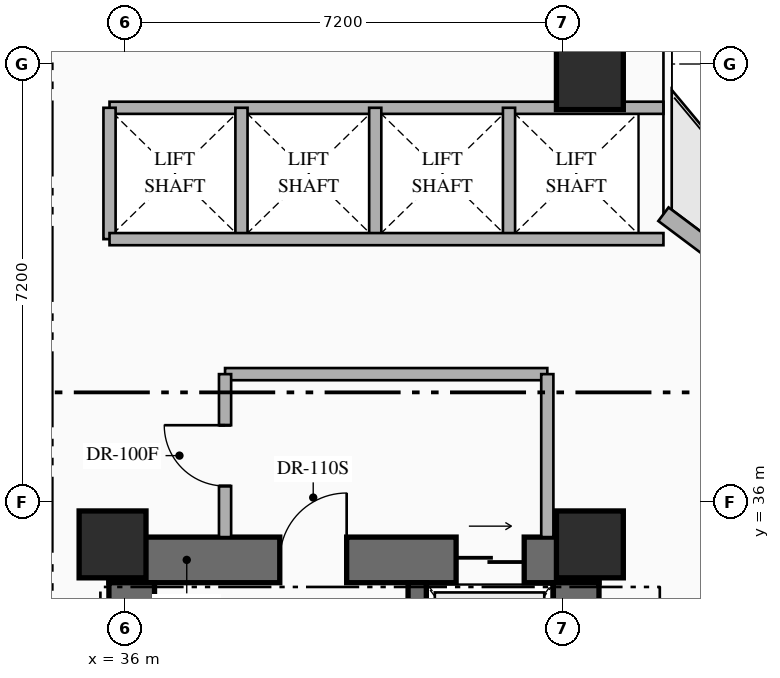
"""IFC4 building model, lengths in metres.
Left out: names, types, materials, properties, quantities, classifications, styles, units other than length and angle.
Written with IfcOpenShell. Run it as: python <this file> out.ifc"""

import sys

from ifc_helpers import new_model, si_unit, direction, frame, frame_2d, origin, origin_2d, place, context, subcontext, project, spatial, rectangle, extrude, element, fill, save


model = new_model("IFC4")
c1 = context("Model", 3, precision=1e-05, world=origin(), true_north=direction((0.0, 1.0)))
c2 = subcontext(c1, "Body", "Model", "MODEL_VIEW")
j1 = project(units=[si_unit("LENGTHUNIT", "METRE"), si_unit("PLANEANGLEUNIT", "RADIAN")], contexts=[c1])
p1 = place(None, origin())
s1 = spatial("IfcSite", under=j1, at=p1, CompositionType="ELEMENT")
p2 = place(p1, origin())
s2 = spatial("IfcBuilding", under=s1, at=p2, CompositionType="ELEMENT")
p3 = place(p2, frame((0.0, 0.0, 36.6)))
s3 = spatial("IfcBuildingStorey", under=s2, at=p3, CompositionType="ELEMENT", Elevation=36.6)
p4 = place(p3, frame((35.74, 35.045, 0.0), z_axis=(0.0, 0.0, 1.0), x_axis=(1.0, 0.0, 0.0)))
e1 = element("IfcWall", 1, at=p4, inside=s3, PredefinedType="SHEAR", context=c2, shape_type="SweptSolid", body=[
    extrude(rectangle(XDim=8.06, YDim=0.75, at=frame_2d((4.03, 0.0))), origin(), (0.0, 0.0, 1.0), 3.35),
])
p5 = place(p4, frame((2.81, 0.0, 0.0)))
e2 = element("IfcOpeningElement", 2, at=p5, cuts=e1, PredefinedType="OPENING", context=c2, shape_type="SweptSolid", body=[
    extrude(rectangle(XDim=1.1, YDim=2.2, at=frame_2d((0.55, 1.1))), frame((0.0, 0.385, 0.0), z_axis=(0.0, -1.0, 0.0), x_axis=(1.0, 0.0, 0.0)), (0.0, 0.0, 1.0), 0.77),
])
p6 = place(p4, frame((5.71, 0.0, 0.0)))
e3 = element("IfcOpeningElement", 3, at=p6, cuts=e1, PredefinedType="OPENING", context=c2, shape_type="SweptSolid", body=[
    extrude(rectangle(XDim=1.12, YDim=2.15, at=frame_2d((0.56, 1.075))), frame((0.0, 0.385, 0.0), z_axis=(0.0, -1.0, 0.0), x_axis=(1.0, 0.0, 0.0)), (0.0, 0.0, 1.0), 0.77),
])
p7 = place(p3, frame((36.115, 25.19, 0.0), z_axis=(0.0, 0.0, 1.0), x_axis=(0.0, 1.0, 0.0)))
e4 = element("IfcWall", 4, at=p7, inside=s3, PredefinedType="SHEAR", context=c2, shape_type="SweptSolid", body=[
    extrude(rectangle(XDim=9.48, YDim=0.75, at=frame_2d((4.74, 0.0))), origin(), (0.0, 0.0, 1.0), 3.35),
])
p8 = place(p3, frame((43.425, 25.19, 0.0), z_axis=(0.0, 0.0, 1.0), x_axis=(0.0, 1.0, 0.0)))
e5 = element("IfcWall", 5, at=p8, inside=s3, PredefinedType="SHEAR", context=c2, shape_type="SweptSolid", body=[
    extrude(rectangle(XDim=9.48, YDim=0.75, at=frame_2d((4.74, 0.0))), origin(), (0.0, 0.0, 1.0), 3.35),
])
p9 = place(p8, frame((1.21, 0.0, 0.0)))
e6 = element("IfcOpeningElement", 6, at=p9, cuts=e5, PredefinedType="OPENING", context=c2, shape_type="SweptSolid", body=[
    extrude(rectangle(XDim=0.85, YDim=2.08, at=frame_2d((0.425, 1.04))), frame((0.0, 0.385, 0.0), z_axis=(0.0, -1.0, 0.0), x_axis=(1.0, 0.0, 0.0)), (0.0, 0.0, 1.0), 0.77),
])
p10 = place(p8, frame((4.46, 0.0, 0.0)))
e7 = element("IfcOpeningElement", 7, at=p10, cuts=e5, PredefinedType="OPENING", context=c2, shape_type="SweptSolid", body=[
    extrude(rectangle(XDim=0.85, YDim=2.08, at=frame_2d((0.425, 1.04))), frame((0.0, 0.385, 0.0), z_axis=(0.0, -1.0, 0.0), x_axis=(1.0, 0.0, 0.0)), (0.0, 0.0, 1.0), 0.77),
])
p11 = place(p3, frame((40.81, 25.19, 0.0), z_axis=(0.0, 0.0, 1.0), x_axis=(0.0, 1.0, 0.0)))
e8 = element("IfcWall", 8, at=p11, inside=s3, PredefinedType="SHEAR", context=c2, shape_type="SweptSolid", body=[
    extrude(rectangle(XDim=9.48, YDim=0.3, at=frame_2d((4.74, 0.0))), origin(), (0.0, 0.0, 1.0), 3.35),
])
for number, where, z_axis, x_axis in (
    (9, (35.8, 35.3, 0.0), (0.0, 0.0, 1.0), (1.0, 0.0, 0.0)),
    (10, (43.65, 35.3, 0.0), (0.0, 0.0, 1.0), (1.0, 0.0, 0.0)),
    (11, (43.65, 43.0, 0.0), (0.0, 0.0, 1.0), (1.0, 0.0, 0.0)),
):
    element("IfcColumn", number, at=place(p3, frame(where, z_axis=z_axis, x_axis=x_axis)), inside=s3, PredefinedType="COLUMN", context=c2, shape_type="SweptSolid", body=[
        extrude(rectangle(XDim=1.1, YDim=1.1, at=origin_2d()), origin(), (0.0, 0.0, 1.0), 3.35),
    ])
p12 = place(p3, frame((44.86, 40.73, 0.0), z_axis=(0.0, 0.0, 1.0), x_axis=(0.800006902154, -0.599990797017, 0.0)))
e12 = element("IfcWall", 12, at=p12, inside=s3, PredefinedType="STANDARD", context=c2, shape_type="SweptSolid", body=[
    extrude(rectangle(XDim=29.712, YDim=0.28, at=frame_2d((14.856, 0.0))), origin(), (0.0, 0.0, 1.0), 3.13),
])
p13 = place(p12, frame((14.249, 0.0, 0.0)))
e13 = element("IfcOpeningElement", 13, at=p13, cuts=e12, PredefinedType="OPENING", context=c2, shape_type="SweptSolid", body=[
    extrude(rectangle(XDim=1.1, YDim=2.2, at=frame_2d((0.55, 1.1))), frame((0.0, 0.15, 0.0), z_axis=(0.0, -1.0, 0.0), x_axis=(1.0, 0.0, 0.0)), (0.0, 0.0, 1.0), 0.3),
])
p14 = place(p12, frame((1.612, 0.0, 0.85)))
e14 = element("IfcOpeningElement", 14, at=p14, cuts=e12, PredefinedType="OPENING", context=c2, shape_type="SweptSolid", body=[
    extrude(rectangle(XDim=1.4, YDim=1.8, at=frame_2d((0.7, 0.9))), frame((0.0, 0.15, 0.0), z_axis=(0.0, -1.0, 0.0), x_axis=(1.0, 0.0, 0.0)), (0.0, 0.0, 1.0), 0.3),
])
p15 = place(p12, frame((5.667, 0.0, 0.85)))
e15 = element("IfcOpeningElement", 15, at=p15, cuts=e12, PredefinedType="OPENING", context=c2, shape_type="SweptSolid", body=[
    extrude(rectangle(XDim=1.4, YDim=1.8, at=frame_2d((0.7, 0.9))), frame((0.0, 0.15, 0.0), z_axis=(0.0, -1.0, 0.0), x_axis=(1.0, 0.0, 0.0)), (0.0, 0.0, 1.0), 0.3),
])
p16 = place(p12, frame((9.912, 0.0, 0.85)))
e16 = element("IfcOpeningElement", 16, at=p16, cuts=e12, PredefinedType="OPENING", context=c2, shape_type="SweptSolid", body=[
    extrude(rectangle(XDim=1.4, YDim=1.8, at=frame_2d((0.7, 0.9))), frame((0.0, 0.15, 0.0), z_axis=(0.0, -1.0, 0.0), x_axis=(1.0, 0.0, 0.0)), (0.0, 0.0, 1.0), 0.3),
])
p17 = place(p12, frame((19.528, 0.0, 0.85)))
e17 = element("IfcOpeningElement", 17, at=p17, cuts=e12, PredefinedType="OPENING", context=c2, shape_type="SweptSolid", body=[
    extrude(rectangle(XDim=1.4, YDim=1.8, at=frame_2d((0.7, 0.9))), frame((0.0, 0.15, 0.0), z_axis=(0.0, -1.0, 0.0), x_axis=(1.0, 0.0, 0.0)), (0.0, 0.0, 1.0), 0.3),
])
p18 = place(p12, frame((23.451, 0.0, 0.85)))
e18 = element("IfcOpeningElement", 18, at=p18, cuts=e12, PredefinedType="OPENING", context=c2, shape_type="SweptSolid", body=[
    extrude(rectangle(XDim=1.4, YDim=1.8, at=frame_2d((0.7, 0.9))), frame((0.0, 0.15, 0.0), z_axis=(0.0, -1.0, 0.0), x_axis=(1.0, 0.0, 0.0)), (0.0, 0.0, 1.0), 0.3),
])
p19 = place(p12, frame((27.852, 0.0, 0.85)))
e19 = element("IfcOpeningElement", 19, at=p19, cuts=e12, PredefinedType="OPENING", context=c2, shape_type="SweptSolid", body=[
    extrude(rectangle(XDim=1.4, YDim=1.8, at=frame_2d((0.7, 0.9))), frame((0.0, 0.15, 0.0), z_axis=(0.0, -1.0, 0.0), x_axis=(1.0, 0.0, 0.0)), (0.0, 0.0, 1.0), 0.3),
])
p20 = place(p3, frame((37.65, 38.1, 0.0), z_axis=(0.0, 0.0, 1.0), x_axis=(1.0, 0.0, 0.0)))
e20 = element("IfcWall", 20, at=p20, inside=s3, PredefinedType="STANDARD", context=c2, shape_type="SweptSolid", body=[
    extrude(rectangle(XDim=5.3, YDim=0.2, at=frame_2d((2.65, 0.0))), origin(), (0.0, 0.0, 1.0), 3.13),
])
p21 = place(p3, frame((42.95, 35.42, 0.0), z_axis=(0.0, 0.0, 1.0), x_axis=(0.0, 1.0, 0.0)))
e21 = element("IfcWall", 21, at=p21, inside=s3, PredefinedType="STANDARD", context=c2, shape_type="SweptSolid", body=[
    extrude(rectangle(XDim=2.68, YDim=0.2, at=frame_2d((1.34, 0.0))), origin(), (0.0, 0.0, 1.0), 3.13),
])
p22 = place(p3, frame((37.65, 35.42, 0.0), z_axis=(0.0, 0.0, 1.0), x_axis=(0.0, 1.0, 0.0)))
e22 = element("IfcWall", 22, at=p22, inside=s3, PredefinedType="STANDARD", context=c2, shape_type="SweptSolid", body=[
    extrude(rectangle(XDim=2.68, YDim=0.2, at=frame_2d((1.34, 0.0))), origin(), (0.0, 0.0, 1.0), 3.13),
])
p23 = place(p22, frame((0.84, 0.0, 0.0)))
e23 = element("IfcOpeningElement", 23, at=p23, cuts=e22, PredefinedType="OPENING", context=c2, shape_type="SweptSolid", body=[
    extrude(rectangle(XDim=1.0, YDim=2.2, at=frame_2d((0.5, 1.1))), frame((0.0, 0.11, 0.0), z_axis=(0.0, -1.0, 0.0), x_axis=(1.0, 0.0, 0.0)), (0.0, 0.0, 1.0), 0.22),
])
p24 = place(p3, frame((35.75, 42.48, 0.0), z_axis=(0.0, 0.0, 1.0), x_axis=(1.0, 0.0, 0.0)))
e24 = element("IfcWall", 24, at=p24, inside=s3, PredefinedType="STANDARD", context=c2, shape_type="SweptSolid", body=[
    extrude(rectangle(XDim=9.11, YDim=0.2, at=frame_2d((4.555, 0.0))), origin(), (0.0, 0.0, 1.0), 3.13),
])
for number, where, z_axis, x_axis in (
    (25, (35.75, 40.32, 0.0), (0.0, 0.0, 1.0), (0.0, 1.0, 0.0)),
    (26, (37.92, 40.32, 0.0), (0.0, 0.0, 1.0), (0.0, 1.0, 0.0)),
    (27, (40.12, 40.32, 0.0), (0.0, 0.0, 1.0), (0.0, 1.0, 0.0)),
    (28, (42.32, 40.32, 0.0), (0.0, 0.0, 1.0), (0.0, 1.0, 0.0)),
):
    element("IfcWall", number, at=place(p3, frame(where, z_axis=z_axis, x_axis=x_axis)), inside=s3, PredefinedType="STANDARD", context=c2, shape_type="SweptSolid", body=[
        extrude(rectangle(XDim=2.16, YDim=0.2, at=frame_2d((1.08, 0.0))), origin(), (0.0, 0.0, 1.0), 3.13),
    ])
p25 = place(p3, frame((35.75, 40.32, 0.0), z_axis=(0.0, 0.0, 1.0), x_axis=(1.0, 0.0, 0.0)))
e29 = element("IfcWall", 29, at=p25, inside=s3, PredefinedType="STANDARD", context=c2, shape_type="SweptSolid", body=[
    extrude(rectangle(XDim=9.11, YDim=0.2, at=frame_2d((4.555, 0.0))), origin(), (0.0, 0.0, 1.0), 3.13),
])
p26 = place(p5, origin())
e30 = element("IfcDoor", 30, at=p26, inside=s3, OperationType="SINGLE_SWING_RIGHT", PredefinedType="DOOR", context=c2, shape_type="SweptSolid", body=[
    extrude(rectangle(XDim=1.1, YDim=2.2, at=frame_2d((0.55, 1.1))), frame((0.0, 0.025, 0.0), z_axis=(0.0, -1.0, 0.0), x_axis=(1.0, 0.0, 0.0)), (0.0, 0.0, 1.0), 0.05),
])
fill(e2, e30)
p27 = place(p6, origin())
e31 = element("IfcDoor", 31, at=p27, inside=s3, OperationType="SLIDING_TO_RIGHT", PredefinedType="USERDEFINED", context=c2, shape_type="SweptSolid", body=[
    extrude(rectangle(XDim=1.12, YDim=2.15, at=frame_2d((0.56, 1.075))), frame((0.0, 0.025, 0.0), z_axis=(0.0, -1.0, 0.0), x_axis=(1.0, 0.0, 0.0)), (0.0, 0.0, 1.0), 0.05),
])
fill(e3, e31)
p28 = place(p23, origin())
e32 = element("IfcDoor", 32, at=p28, inside=s3, OperationType="SINGLE_SWING_RIGHT", PredefinedType="DOOR", context=c2, shape_type="SweptSolid", body=[
    extrude(rectangle(XDim=1.0, YDim=2.2, at=frame_2d((0.5, 1.1))), frame((0.0, 0.025, 0.0), z_axis=(0.0, -1.0, 0.0), x_axis=(1.0, 0.0, 0.0)), (0.0, 0.0, 1.0), 0.05),
])
fill(e23, e32)
save(model, sys.argv[1])
